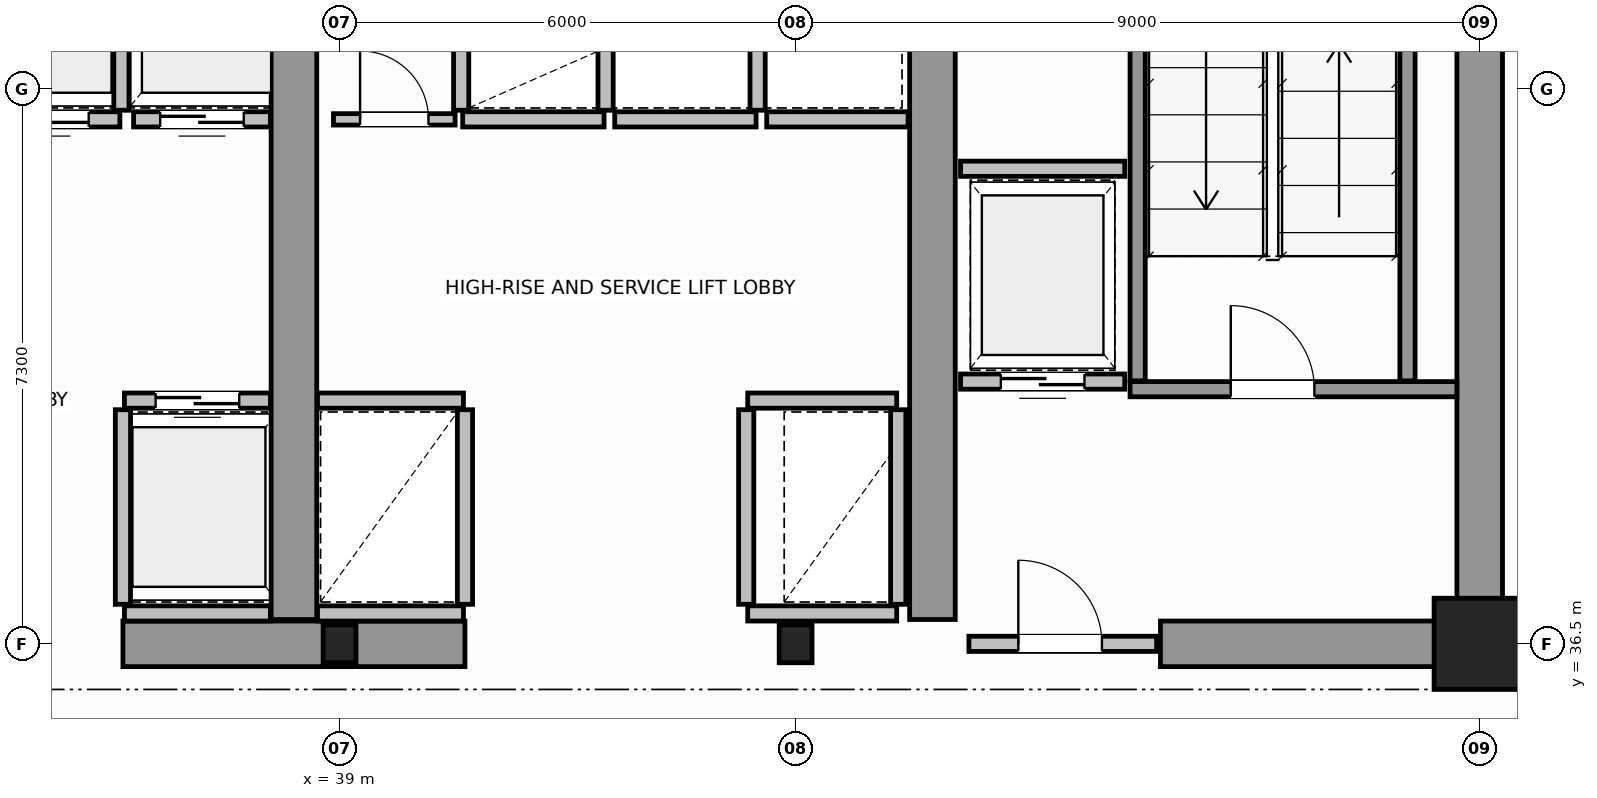
"""IFC4 building model, lengths in metres.
Left out: names, types, materials, properties, quantities, classifications, styles, units other than length and angle.
Written with IfcOpenShell. Run it as: python <this file> out.ifc"""

import sys

from ifc_helpers import new_model, si_unit, direction, frame, frame_2d, origin, origin_2d, place, context, subcontext, project, spatial, rectangle, i_section, extrude, source, transform, mapped, element, fill, save


model = new_model("IFC4")
c1 = context("Model", 3, precision=1e-05, world=origin(), true_north=direction((0.0, 1.0)))
c2 = subcontext(c1, "Body", "Model", "MODEL_VIEW")
j1 = project(units=[si_unit("LENGTHUNIT", "METRE"), si_unit("PLANEANGLEUNIT", "RADIAN")], contexts=[c1])
p1 = place(None, origin())
s1 = spatial("IfcSite", under=j1, at=p1, CompositionType="ELEMENT")
p2 = place(p1, origin())
s2 = spatial("IfcBuilding", under=s1, at=p2, CompositionType="ELEMENT")
p3 = place(p2, frame((0.0, 0.0, 172.8)))
s3 = spatial("IfcBuildingStorey", under=s2, at=p3, CompositionType="ELEMENT", Elevation=172.8)
m1 = source(origin(), c2, "Body", "SweptSolid", [
    extrude(i_section(OverallWidth=0.432, OverallDepth=0.498, WebThickness=0.055, FlangeThickness=0.068, FilletRadius=0.015, at=origin_2d()), origin(), (0.0, 0.0, 1.0), 3.8),
])
for number, where, z_axis, x_axis in (
    (1, (39.0, 36.5, 0.0), (0.0, 0.0, 1.0), (1.0, 0.0, 0.0)),
    (2, (45.0, 36.5, 0.0), (0.0, 0.0, 1.0), (1.0, 0.0, 0.0)),
):
    element("IfcColumn", number, at=place(p3, frame(where, z_axis=z_axis, x_axis=x_axis)), inside=s3, PredefinedType="COLUMN", context=c2, shape_type="MappedRepresentation", body=[
        mapped(m1, transform((0.0, 0.0, 0.0), scale=1.0)),
    ])
m2 = source(origin(), c2, "Body", "SweptSolid", [
    extrude(rectangle(XDim=1.2, YDim=1.2, at=origin_2d()), origin(), (0.0, 0.0, 1.0), 3.8),
])
p4 = place(p3, frame((54.0, 36.5, 0.0), z_axis=(0.0, 0.0, 1.0), x_axis=(1.0, 0.0, 0.0)))
e3 = element("IfcColumn", 3, at=p4, inside=s3, PredefinedType="COLUMN", context=c2, shape_type="MappedRepresentation", body=[
    mapped(m2, transform((0.0, 0.0, 0.0), scale=1.0)),
])
p5 = place(p3, frame((54.0, 36.5, 0.0), z_axis=(0.0, 0.0, 1.0), x_axis=(0.0, 1.0, 0.0)))
e4 = element("IfcWall", 4, at=p5, inside=s3, PredefinedType="SHEAR", context=c2, shape_type="SweptSolid", body=[
    extrude(rectangle(XDim=14.5, YDim=0.6, at=frame_2d((7.25, 0.0))), origin(), (0.0, 0.0, 1.0), 3.8),
])
p6 = place(p3, frame((36.15, 36.5, 0.0), z_axis=(0.0, 0.0, 1.0), x_axis=(1.0, 0.0, 0.0)))
e5 = element("IfcWall", 5, at=p6, inside=s3, PredefinedType="SHEAR", context=c2, shape_type="SweptSolid", body=[
    extrude(rectangle(XDim=4.5, YDim=0.6, at=frame_2d((2.25, 0.0))), origin(), (0.0, 0.0, 1.0), 3.8),
])
p7 = place(p3, frame((49.8, 36.5, 0.0), z_axis=(0.0, 0.0, 1.0), x_axis=(1.0, 0.0, 0.0)))
e6 = element("IfcWall", 6, at=p7, inside=s3, PredefinedType="SHEAR", context=c2, shape_type="SweptSolid", body=[
    extrude(rectangle(XDim=3.88, YDim=0.6, at=frame_2d((1.94, 0.0))), origin(), (0.0, 0.0, 1.0), 2.58),
])
for number, where, z_axis, x_axis in (
    (7, (38.4, 36.82, 0.0), (0.0, 0.0, 1.0), (0.0, 1.0, 0.0)),
    (8, (46.8, 36.82, 0.0), (0.0, 0.0, 1.0), (0.0, 1.0, 0.0)),
):
    element("IfcWall", number, at=place(p3, frame(where, z_axis=z_axis, x_axis=x_axis)), inside=s3, PredefinedType="SHEAR", context=c2, shape_type="SweptSolid", body=[
        extrude(rectangle(XDim=9.38, YDim=0.6, at=frame_2d((4.69, 0.0))), origin(), (0.0, 0.0, 1.0), 3.8),
    ])
p8 = place(p3, frame((49.4, 39.85, 0.0), z_axis=(0.0, 0.0, 1.0), x_axis=(1.0, 0.0, 0.0)))
e9 = element("IfcWall", 9, at=p8, inside=s3, PredefinedType="SOLIDWALL", context=c2, shape_type="SweptSolid", body=[
    extrude(rectangle(XDim=4.3, YDim=0.2, at=frame_2d((2.15, 0.0))), origin(), (0.0, 0.0, 1.0), 3.8),
])
p9 = place(p8, frame((1.325, 0.0, 0.0)))
e10 = element("IfcOpeningElement", 10, at=p9, cuts=e9, PredefinedType="OPENING", context=c2, shape_type="SweptSolid", body=[
    extrude(rectangle(XDim=1.1, YDim=2.15, at=frame_2d((0.55, 1.075))), frame((0.0, 0.11, 0.0), z_axis=(0.0, -1.0, 0.0), x_axis=(1.0, 0.0, 0.0)), (0.0, 0.0, 1.0), 0.22),
])
for number, where, z_axis, x_axis in (
    (11, (49.5, 39.96, 0.0), (0.0, 0.0, 1.0), (0.0, 1.0, 0.0)),
    (12, (53.05, 39.96, 0.0), (0.0, 0.0, 1.0), (0.0, 1.0, 0.0)),
):
    element("IfcWall", number, at=place(p3, frame(where, z_axis=z_axis, x_axis=x_axis)), inside=s3, PredefinedType="SOLIDWALL", context=c2, shape_type="SweptSolid", body=[
        extrude(rectangle(XDim=9.93, YDim=0.2, at=frame_2d((4.965, 0.0))), origin(), (0.0, 0.0, 1.0), 3.8),
    ])
p10 = place(p3, frame((47.28, 36.5, 0.0), z_axis=(0.0, 0.0, 1.0), x_axis=(1.0, 0.0, 0.0)))
e13 = element("IfcWall", 13, at=p10, inside=s3, PredefinedType="SOLIDWALL", context=c2, shape_type="SweptSolid", body=[
    extrude(rectangle(XDim=2.47, YDim=0.2, at=frame_2d((1.235, 0.0))), origin(), (0.0, 0.0, 1.0), 2.57),
])
p11 = place(p10, frame((0.65, 0.0, 0.0)))
e14 = element("IfcOpeningElement", 14, at=p11, cuts=e13, PredefinedType="OPENING", context=c2, shape_type="SweptSolid", body=[
    extrude(rectangle(XDim=1.1, YDim=2.15, at=frame_2d((0.55, 1.075))), frame((0.0, 0.11, 0.0), z_axis=(0.0, -1.0, 0.0), x_axis=(1.0, 0.0, 0.0)), (0.0, 0.0, 1.0), 0.22),
])
p12 = place(p3, frame((36.17, 39.7, 0.0), z_axis=(0.0, 0.0, 1.0), x_axis=(1.0, 0.0, 0.0)))
e15 = element("IfcWall", 15, at=p12, inside=s3, PredefinedType="SOLIDWALL", context=c2, shape_type="SweptSolid", body=[
    extrude(rectangle(XDim=1.92, YDim=0.2, at=frame_2d((0.96, 0.0))), origin(), (0.0, 0.0, 1.0), 3.58),
])
p13 = place(p12, frame((0.41, 0.0, 0.0)))
e16 = element("IfcOpeningElement", 16, at=p13, cuts=e15, PredefinedType="OPENING", context=c2, shape_type="SweptSolid", body=[
    extrude(rectangle(XDim=1.1, YDim=2.15, at=frame_2d((0.55, 1.075))), frame((0.0, 0.11, 0.0), z_axis=(0.0, -1.0, 0.0), x_axis=(1.0, 0.0, 0.0)), (0.0, 0.0, 1.0), 0.22),
])
p14 = place(p3, frame((36.17, 36.9, 0.0), z_axis=(0.0, 0.0, 1.0), x_axis=(1.0, 0.0, 0.0)))
e17 = element("IfcWall", 17, at=p14, inside=s3, PredefinedType="SOLIDWALL", context=c2, shape_type="SweptSolid", body=[
    extrude(rectangle(XDim=1.92, YDim=0.2, at=frame_2d((0.96, 0.0))), origin(), (0.0, 0.0, 1.0), 3.58),
])
p15 = place(p3, frame((36.15, 37.02, 0.0), z_axis=(0.0, 0.0, 1.0), x_axis=(0.0, 1.0, 0.0)))
e18 = element("IfcWall", 18, at=p15, inside=s3, PredefinedType="SOLIDWALL", context=c2, shape_type="SweptSolid", body=[
    extrude(rectangle(XDim=2.56, YDim=0.2, at=frame_2d((1.28, 0.0))), origin(), (0.0, 0.0, 1.0), 3.58),
])
p16 = place(p3, frame((34.19, 43.4, 0.0), z_axis=(0.0, 0.0, 1.0), x_axis=(1.0, 0.0, 0.0)))
e19 = element("IfcWall", 19, at=p16, inside=s3, PredefinedType="SOLIDWALL", context=c2, shape_type="SweptSolid", body=[
    extrude(rectangle(XDim=1.92, YDim=0.2, at=frame_2d((0.96, 0.0))), origin(), (0.0, 0.0, 1.0), 3.58),
])
p17 = place(p16, frame((0.41, 0.0, 0.0)))
e20 = element("IfcOpeningElement", 20, at=p17, cuts=e19, PredefinedType="OPENING", context=c2, shape_type="SweptSolid", body=[
    extrude(rectangle(XDim=1.1, YDim=2.15, at=frame_2d((0.55, 1.075))), frame((0.0, 0.11, 0.0), z_axis=(0.0, -1.0, 0.0), x_axis=(1.0, 0.0, 0.0)), (0.0, 0.0, 1.0), 0.22),
])
p18 = place(p3, frame((36.13, 43.52, 0.0), z_axis=(0.0, 0.0, 1.0), x_axis=(0.0, 1.0, 0.0)))
e21 = element("IfcWall", 21, at=p18, inside=s3, PredefinedType="SOLIDWALL", context=c2, shape_type="SweptSolid", body=[
    extrude(rectangle(XDim=2.56, YDim=0.2, at=frame_2d((1.28, 0.0))), origin(), (0.0, 0.0, 1.0), 3.58),
])
p19 = place(p3, frame((36.29, 43.4, 0.0), z_axis=(0.0, 0.0, 1.0), x_axis=(1.0, 0.0, 0.0)))
e22 = element("IfcWall", 22, at=p19, inside=s3, PredefinedType="SOLIDWALL", context=c2, shape_type="SweptSolid", body=[
    extrude(rectangle(XDim=1.8, YDim=0.2, at=frame_2d((0.9, 0.0))), origin(), (0.0, 0.0, 1.0), 3.58),
])
p20 = place(p19, frame((0.35, 0.0, 0.0)))
e23 = element("IfcOpeningElement", 23, at=p20, cuts=e22, PredefinedType="OPENING", context=c2, shape_type="SweptSolid", body=[
    extrude(rectangle(XDim=1.1, YDim=2.15, at=frame_2d((0.55, 1.075))), frame((0.0, 0.11, 0.0), z_axis=(0.0, -1.0, 0.0), x_axis=(1.0, 0.0, 0.0)), (0.0, 0.0, 1.0), 0.22),
])
for number, where, z_axis, x_axis in (
    (24, (38.71, 39.7, 0.0), (0.0, 0.0, 1.0), (1.0, 0.0, 0.0)),
    (25, (38.71, 36.9, 0.0), (0.0, 0.0, 1.0), (1.0, 0.0, 0.0)),
):
    element("IfcWall", number, at=place(p3, frame(where, z_axis=z_axis, x_axis=x_axis)), inside=s3, PredefinedType="SOLIDWALL", context=c2, shape_type="SweptSolid", body=[
        extrude(rectangle(XDim=1.92, YDim=0.2, at=frame_2d((0.96, 0.0))), origin(), (0.0, 0.0, 1.0), 3.58),
    ])
p21 = place(p3, frame((40.65, 37.02, 0.0), z_axis=(0.0, 0.0, 1.0), x_axis=(0.0, 1.0, 0.0)))
e26 = element("IfcWall", 26, at=p21, inside=s3, PredefinedType="SOLIDWALL", context=c2, shape_type="SweptSolid", body=[
    extrude(rectangle(XDim=2.56, YDim=0.2, at=frame_2d((1.28, 0.0))), origin(), (0.0, 0.0, 1.0), 3.58),
])
p22 = place(p3, frame((44.37, 39.7, 0.0), z_axis=(0.0, 0.0, 1.0), x_axis=(1.0, 0.0, 0.0)))
e27 = element("IfcWall", 27, at=p22, inside=s3, PredefinedType="SOLIDWALL", context=c2, shape_type="SweptSolid", body=[
    extrude(rectangle(XDim=1.96, YDim=0.2, at=frame_2d((0.98, 0.0))), origin(), (0.0, 0.0, 1.0), 3.58),
])
p23 = place(p3, frame((44.37, 36.9, 0.0), z_axis=(0.0, 0.0, 1.0), x_axis=(1.0, 0.0, 0.0)))
e28 = element("IfcWall", 28, at=p23, inside=s3, PredefinedType="SOLIDWALL", context=c2, shape_type="SweptSolid", body=[
    extrude(rectangle(XDim=1.96, YDim=0.2, at=frame_2d((0.98, 0.0))), origin(), (0.0, 0.0, 1.0), 2.57),
])
for number, where, z_axis, x_axis in (
    (29, (44.35, 37.02, 0.0), (0.0, 0.0, 1.0), (0.0, 1.0, 0.0)),
    (30, (46.35, 37.02, 0.0), (0.0, 0.0, 1.0), (0.0, 1.0, 0.0)),
):
    element("IfcWall", number, at=place(p3, frame(where, z_axis=z_axis, x_axis=x_axis)), inside=s3, PredefinedType="SOLIDWALL", context=c2, shape_type="SweptSolid", body=[
        extrude(rectangle(XDim=2.56, YDim=0.2, at=frame_2d((1.28, 0.0))), origin(), (0.0, 0.0, 1.0), 3.58),
    ])
p24 = place(p3, frame((40.62, 43.4, 0.0), z_axis=(0.0, 0.0, 1.0), x_axis=(1.0, 0.0, 0.0)))
e31 = element("IfcWall", 31, at=p24, inside=s3, PredefinedType="SOLIDWALL", context=c2, shape_type="SweptSolid", body=[
    extrude(rectangle(XDim=1.86, YDim=0.2, at=frame_2d((0.93, 0.0))), origin(), (0.0, 0.0, 1.0), 3.58),
])
for number, where, z_axis, x_axis in (
    (32, (40.6, 43.52, 0.0), (0.0, 0.0, 1.0), (0.0, 1.0, 0.0)),
    (33, (42.5, 43.52, 0.0), (0.0, 0.0, 1.0), (0.0, 1.0, 0.0)),
):
    element("IfcWall", number, at=place(p3, frame(where, z_axis=z_axis, x_axis=x_axis)), inside=s3, PredefinedType="SOLIDWALL", context=c2, shape_type="SweptSolid", body=[
        extrude(rectangle(XDim=2.56, YDim=0.2, at=frame_2d((1.28, 0.0))), origin(), (0.0, 0.0, 1.0), 3.58),
    ])
p25 = place(p3, frame((42.62, 43.4, 0.0), z_axis=(0.0, 0.0, 1.0), x_axis=(1.0, 0.0, 0.0)))
e34 = element("IfcWall", 34, at=p25, inside=s3, PredefinedType="SOLIDWALL", context=c2, shape_type="SweptSolid", body=[
    extrude(rectangle(XDim=1.86, YDim=0.2, at=frame_2d((0.93, 0.0))), origin(), (0.0, 0.0, 1.0), 3.58),
])
p26 = place(p3, frame((44.5, 43.52, 0.0), z_axis=(0.0, 0.0, 1.0), x_axis=(0.0, 1.0, 0.0)))
e35 = element("IfcWall", 35, at=p26, inside=s3, PredefinedType="SOLIDWALL", context=c2, shape_type="SweptSolid", body=[
    extrude(rectangle(XDim=2.56, YDim=0.2, at=frame_2d((1.28, 0.0))), origin(), (0.0, 0.0, 1.0), 3.58),
])
p27 = place(p3, frame((44.62, 43.4, 0.0), z_axis=(0.0, 0.0, 1.0), x_axis=(1.0, 0.0, 0.0)))
e36 = element("IfcWall", 36, at=p27, inside=s3, PredefinedType="SOLIDWALL", context=c2, shape_type="SweptSolid", body=[
    extrude(rectangle(XDim=1.86, YDim=0.2, at=frame_2d((0.93, 0.0))), origin(), (0.0, 0.0, 1.0), 3.58),
])
p28 = place(p3, frame((47.17, 39.95, 0.0), z_axis=(0.0, 0.0, 1.0), x_axis=(1.0, 0.0, 0.0)))
e37 = element("IfcWall", 37, at=p28, inside=s3, PredefinedType="SOLIDWALL", context=c2, shape_type="SweptSolid", body=[
    extrude(rectangle(XDim=2.16, YDim=0.2, at=frame_2d((1.08, 0.0))), origin(), (0.0, 0.0, 1.0), 3.58),
])
p29 = place(p28, frame((0.53, 0.0, 0.0)))
e38 = element("IfcOpeningElement", 38, at=p29, cuts=e37, PredefinedType="OPENING", context=c2, shape_type="SweptSolid", body=[
    extrude(rectangle(XDim=1.1, YDim=2.15, at=frame_2d((0.55, 1.075))), frame((0.0, 0.11, 0.0), z_axis=(0.0, -1.0, 0.0), x_axis=(1.0, 0.0, 0.0)), (0.0, 0.0, 1.0), 0.22),
])
p30 = place(p3, frame((47.17, 42.75, 0.0), z_axis=(0.0, 0.0, 1.0), x_axis=(1.0, 0.0, 0.0)))
e39 = element("IfcWall", 39, at=p30, inside=s3, PredefinedType="SOLIDWALL", context=c2, shape_type="SweptSolid", body=[
    extrude(rectangle(XDim=2.16, YDim=0.2, at=frame_2d((1.08, 0.0))), origin(), (0.0, 0.0, 1.0), 3.58),
])
p31 = place(p3, frame((38.92, 43.4, 0.0), z_axis=(0.0, 0.0, 1.0), x_axis=(1.0, 0.0, 0.0)))
e40 = element("IfcWall", 40, at=p31, inside=s3, PredefinedType="PARTITIONING", context=c2, shape_type="SweptSolid", body=[
    extrude(rectangle(XDim=1.6, YDim=0.15, at=frame_2d((0.8, 0.0))), origin(), (0.0, 0.0, 1.0), 3.58),
])
p32 = place(p31, frame((0.35, 0.0, 0.0)))
e41 = element("IfcOpeningElement", 41, at=p32, cuts=e40, PredefinedType="OPENING", context=c2, shape_type="SweptSolid", body=[
    extrude(rectangle(XDim=0.9, YDim=2.1, at=frame_2d((0.45, 1.05))), frame((0.0, 0.085, 0.0), z_axis=(0.0, -1.0, 0.0), x_axis=(1.0, 0.0, 0.0)), (0.0, 0.0, 1.0), 0.17),
])
p33 = place(p3, frame((54.06, 36.48, 0.0), z_axis=(0.0, 0.0, 1.0), x_axis=(1.0, 0.0, 0.0)))
e42 = element("IfcWall", 42, at=p33, inside=s3, PredefinedType="PARTITIONING", context=c2, shape_type="SweptSolid", body=[
    extrude(rectangle(XDim=6.666, YDim=0.12, at=frame_2d((3.333, 0.0))), origin(), (0.0, 0.0, 1.0), 2.97),
])
p34 = place(p33, frame((2.883, 0.0, 0.0)))
e43 = element("IfcOpeningElement", 43, at=p34, cuts=e42, PredefinedType="OPENING", context=c2, shape_type="SweptSolid", body=[
    extrude(rectangle(XDim=0.9, YDim=2.15, at=frame_2d((0.45, 1.075))), frame((0.0, 0.07, 0.0), z_axis=(0.0, -1.0, 0.0), x_axis=(1.0, 0.0, 0.0)), (0.0, 0.0, 1.0), 0.14),
])
m3 = source(origin(), c2, "Body", "SweptSolid", [
    extrude(rectangle(XDim=1.1, YDim=2.15, at=frame_2d((0.55, 1.075))), frame((0.0, 0.025, 0.0), z_axis=(0.0, -1.0, 0.0), x_axis=(1.0, 0.0, 0.0)), (0.0, 0.0, 1.0), 0.05),
])
p35 = place(p9, origin())
e44 = element("IfcDoor", 44, at=p35, inside=s3, OperationType="SINGLE_SWING_RIGHT", PredefinedType="DOOR", context=c2, shape_type="MappedRepresentation", body=[
    mapped(m3, transform((0.0, 0.0, 0.0), scale=1.0)),
])
fill(e10, e44)
p36 = place(p11, origin())
e45 = element("IfcDoor", 45, at=p36, inside=s3, OperationType="SINGLE_SWING_LEFT", PredefinedType="DOOR", context=c2, shape_type="MappedRepresentation", body=[
    mapped(m3, transform((0.0, 0.0, 0.0), scale=1.0)),
])
fill(e14, e45)
p37 = place(p13, origin())
e46 = element("IfcDoor", 46, at=p37, inside=s3, OperationType="DOUBLE_DOOR_SLIDING", PredefinedType="DOOR", context=c2, shape_type="MappedRepresentation", body=[
    mapped(m3, transform((0.0, 0.0, 0.0), scale=1.0)),
])
fill(e16, e46)
p38 = place(p17, origin())
e47 = element("IfcDoor", 47, at=p38, inside=s3, OperationType="DOUBLE_DOOR_SLIDING", PredefinedType="DOOR", context=c2, shape_type="MappedRepresentation", body=[
    mapped(m3, transform((0.0, 0.0, 0.0), scale=1.0)),
])
fill(e20, e47)
p39 = place(p20, origin())
e48 = element("IfcDoor", 48, at=p39, inside=s3, OperationType="DOUBLE_DOOR_SLIDING", PredefinedType="DOOR", context=c2, shape_type="MappedRepresentation", body=[
    mapped(m3, transform((0.0, 0.0, 0.0), scale=1.0)),
])
fill(e23, e48)
p40 = place(p29, origin())
e49 = element("IfcDoor", 49, at=p40, inside=s3, OperationType="DOUBLE_DOOR_SLIDING", PredefinedType="DOOR", context=c2, shape_type="MappedRepresentation", body=[
    mapped(m3, transform((0.0, 0.0, 0.0), scale=1.0)),
])
fill(e38, e49)
m4 = source(origin(), c2, "Body", "SweptSolid", [
    extrude(rectangle(XDim=0.9, YDim=2.1, at=frame_2d((0.45, 1.05))), frame((0.0, 0.025, 0.0), z_axis=(0.0, -1.0, 0.0), x_axis=(1.0, 0.0, 0.0)), (0.0, 0.0, 1.0), 0.05),
])
p41 = place(p32, origin())
e50 = element("IfcDoor", 50, at=p41, inside=s3, OperationType="SINGLE_SWING_LEFT", PredefinedType="DOOR", context=c2, shape_type="MappedRepresentation", body=[
    mapped(m4, transform((0.0, 0.0, 0.0), scale=1.0)),
])
fill(e41, e50)
save(model, sys.argv[1])
